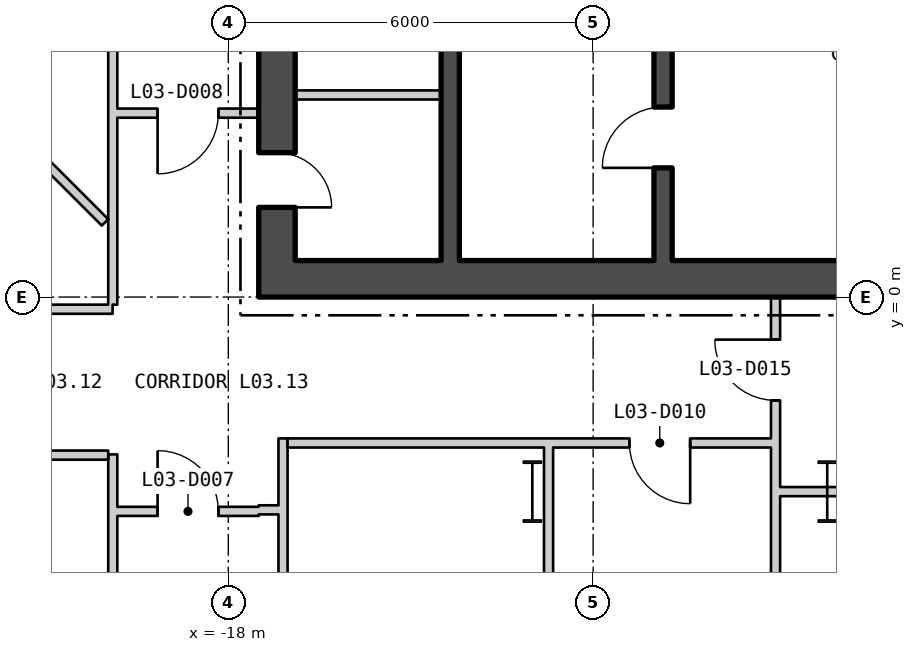
"""IFC4 building model, lengths in metres.
Left out: names, types, materials, properties, quantities, classifications, styles, units other than length and angle.
Written with IfcOpenShell. Run it as: python <this file> out.ifc"""

import sys

from ifc_helpers import new_model, si_unit, direction, frame, frame_2d, origin, origin_2d, place, context, subcontext, project, spatial, rectangle, i_section, extrude, element, fill, save


model = new_model("IFC4")
c1 = context("Model", 3, precision=1e-05, world=origin(), true_north=direction((0.0, 1.0)))
c2 = subcontext(c1, "Body", "Model", "MODEL_VIEW")
j1 = project(units=[si_unit("LENGTHUNIT", "METRE"), si_unit("PLANEANGLEUNIT", "RADIAN")], contexts=[c1])
p1 = place(None, origin())
s1 = spatial("IfcSite", under=j1, at=p1, CompositionType="ELEMENT")
p2 = place(p1, origin())
s2 = spatial("IfcBuilding", under=s1, at=p2, CompositionType="ELEMENT")
p3 = place(p2, frame((0.0, 0.0, 18.6)))
s3 = spatial("IfcBuildingStorey", under=s2, at=p3, CompositionType="ELEMENT", Elevation=18.6)
for number, where, z_axis, x_axis in (
    (1, (-8.15, -3.2, 0.0), (0.0, 0.0, 1.0), (1.0, 0.0, 0.0)),
    (2, (-13.0, -3.2, 0.0), (0.0, 0.0, 1.0), (1.0, 0.0, 0.0)),
):
    element("IfcColumn", number, at=place(p3, frame(where, z_axis=z_axis, x_axis=x_axis)), inside=s3, PredefinedType="COLUMN", context=c2, shape_type="SweptSolid", body=[
        extrude(i_section(OverallWidth=0.302, OverallDepth=1.008, WebThickness=0.021, FlangeThickness=0.04, at=origin_2d()), origin(), (0.0, 0.0, 1.0), 5.1),
    ])
p4 = place(p3, frame((-17.5, 0.3, 0.0), z_axis=(0.0, 0.0, 1.0), x_axis=(1.0, 0.0, 0.0)))
e3 = element("IfcWall", 3, at=p4, inside=s3, PredefinedType="SHEAR", context=c2, shape_type="SweptSolid", body=[
    extrude(rectangle(XDim=35.0, YDim=0.6, at=frame_2d((17.5, 0.0))), origin(), (0.0, 0.0, 1.0), 4.88),
])
p5 = place(p4, frame((12.0, 0.0, 0.0)))
e4 = element("IfcOpeningElement", 4, at=p5, cuts=e3, PredefinedType="OPENING", context=c2, shape_type="SweptSolid", body=[
    extrude(rectangle(XDim=1.8, YDim=2.4, at=frame_2d((0.9, 1.2))), frame((0.0, 0.31, 0.0), z_axis=(0.0, -1.0, 0.0), x_axis=(1.0, 0.0, 0.0)), (0.0, 0.0, 1.0), 0.62),
])
p6 = place(p4, frame((22.0, 0.0, 0.0)))
e5 = element("IfcOpeningElement", 5, at=p6, cuts=e3, PredefinedType="OPENING", context=c2, shape_type="SweptSolid", body=[
    extrude(rectangle(XDim=1.8, YDim=2.4, at=frame_2d((0.9, 1.2))), frame((0.0, 0.31, 0.0), z_axis=(0.0, -1.0, 0.0), x_axis=(1.0, 0.0, 0.0)), (0.0, 0.0, 1.0), 0.62),
])
p7 = place(p3, frame((-17.2, 0.6, 0.0), z_axis=(0.0, 0.0, 1.0), x_axis=(0.0, 1.0, 0.0)))
e6 = element("IfcWall", 6, at=p7, inside=s3, PredefinedType="SHEAR", context=c2, shape_type="SweptSolid", body=[
    extrude(rectangle(XDim=16.8, YDim=0.6, at=frame_2d((8.4, 0.0))), origin(), (0.0, 0.0, 1.0), 4.88),
])
p8 = place(p7, frame((5.7, 0.0, 0.0)))
e7 = element("IfcOpeningElement", 7, at=p8, cuts=e6, PredefinedType="OPENING", context=c2, shape_type="SweptSolid", body=[
    extrude(rectangle(XDim=1.5, YDim=2.1, at=frame_2d((0.75, 1.05))), frame((0.0, 0.31, 0.0), z_axis=(0.0, -1.0, 0.0), x_axis=(1.0, 0.0, 0.0)), (0.0, 0.0, 1.0), 0.62),
])
p9 = place(p7, frame((0.875, 0.0, 0.0)))
e8 = element("IfcOpeningElement", 8, at=p9, cuts=e6, PredefinedType="OPENING", context=c2, shape_type="SweptSolid", body=[
    extrude(rectangle(XDim=0.9, YDim=2.1, at=frame_2d((0.45, 1.05))), frame((0.0, 0.31, 0.0), z_axis=(0.0, -1.0, 0.0), x_axis=(1.0, 0.0, 0.0)), (0.0, 0.0, 1.0), 0.62),
])
p10 = place(p7, frame((3.724, 0.0, 0.0)))
e9 = element("IfcOpeningElement", 9, at=p10, cuts=e6, PredefinedType="OPENING", context=c2, shape_type="SweptSolid", body=[
    extrude(rectangle(XDim=0.9, YDim=2.1, at=frame_2d((0.45, 1.05))), frame((0.0, 0.31, 0.0), z_axis=(0.0, -1.0, 0.0), x_axis=(1.0, 0.0, 0.0)), (0.0, 0.0, 1.0), 0.62),
])
p11 = place(p7, frame((8.115, 0.0, 0.0)))
e10 = element("IfcOpeningElement", 10, at=p11, cuts=e6, PredefinedType="OPENING", context=c2, shape_type="SweptSolid", body=[
    extrude(rectangle(XDim=1.0, YDim=2.1, at=frame_2d((0.5, 1.05))), frame((0.0, 0.31, 0.0), z_axis=(0.0, -1.0, 0.0), x_axis=(1.0, 0.0, 0.0)), (0.0, 0.0, 1.0), 0.62),
])
p12 = place(p7, frame((11.528, 0.0, 0.0)))
e11 = element("IfcOpeningElement", 11, at=p12, cuts=e6, PredefinedType="OPENING", context=c2, shape_type="SweptSolid", body=[
    extrude(rectangle(XDim=0.9, YDim=2.1, at=frame_2d((0.45, 1.05))), frame((0.0, 0.31, 0.0), z_axis=(0.0, -1.0, 0.0), x_axis=(1.0, 0.0, 0.0)), (0.0, 0.0, 1.0), 0.62),
])
p13 = place(p7, frame((14.987, 0.0, 0.0)))
e12 = element("IfcOpeningElement", 12, at=p13, cuts=e6, PredefinedType="OPENING", context=c2, shape_type="SweptSolid", body=[
    extrude(rectangle(XDim=0.9, YDim=2.1, at=frame_2d((0.45, 1.05))), frame((0.0, 0.31, 0.0), z_axis=(0.0, -1.0, 0.0), x_axis=(1.0, 0.0, 0.0)), (0.0, 0.0, 1.0), 0.62),
])
p14 = place(p3, frame((-10.85, 0.6, 0.0), z_axis=(0.0, 0.0, 1.0), x_axis=(0.0, 1.0, 0.0)))
e13 = element("IfcWall", 13, at=p14, inside=s3, PredefinedType="SHEAR", context=c2, shape_type="SweptSolid", body=[
    extrude(rectangle(XDim=16.8, YDim=0.3, at=frame_2d((8.4, 0.0))), origin(), (0.0, 0.0, 1.0), 4.88),
])
p15 = place(p14, frame((5.075, 0.0, 0.0)))
e14 = element("IfcOpeningElement", 14, at=p15, cuts=e13, PredefinedType="OPENING", context=c2, shape_type="SweptSolid", body=[
    extrude(rectangle(XDim=1.25, YDim=2.1, at=frame_2d((0.625, 1.05))), frame((0.0, 0.16, 0.0), z_axis=(0.0, -1.0, 0.0), x_axis=(1.0, 0.0, 0.0)), (0.0, 0.0, 1.0), 0.32),
])
p16 = place(p14, frame((1.525, 0.0, 0.0)))
e15 = element("IfcOpeningElement", 15, at=p16, cuts=e13, PredefinedType="OPENING", context=c2, shape_type="SweptSolid", body=[
    extrude(rectangle(XDim=1.0, YDim=2.1, at=frame_2d((0.5, 1.05))), frame((0.0, 0.16, 0.0), z_axis=(0.0, -1.0, 0.0), x_axis=(1.0, 0.0, 0.0)), (0.0, 0.0, 1.0), 0.32),
])
p17 = place(p3, frame((-14.35, 0.6, 0.0), z_axis=(0.0, 0.0, 1.0), x_axis=(0.0, 1.0, 0.0)))
e16 = element("IfcWall", 16, at=p17, inside=s3, PredefinedType="SHEAR", context=c2, shape_type="SweptSolid", body=[
    extrude(rectangle(XDim=16.8, YDim=0.3, at=frame_2d((8.4, 0.0))), origin(), (0.0, 0.0, 1.0), 4.88),
])
p18 = place(p17, frame((5.7, 0.0, 0.0)))
e17 = element("IfcOpeningElement", 17, at=p18, cuts=e16, PredefinedType="OPENING", context=c2, shape_type="SweptSolid", body=[
    extrude(rectangle(XDim=1.5, YDim=2.1, at=frame_2d((0.75, 1.05))), frame((0.0, 0.16, 0.0), z_axis=(0.0, -1.0, 0.0), x_axis=(1.0, 0.0, 0.0)), (0.0, 0.0, 1.0), 0.32),
])
p19 = place(p3, frame((-16.9, 3.324, 0.0), z_axis=(0.0, 0.0, 1.0), x_axis=(1.0, 0.0, 0.0)))
e18 = element("IfcWall", 18, at=p19, inside=s3, PredefinedType="PARTITIONING", context=c2, shape_type="SweptSolid", body=[
    extrude(rectangle(XDim=2.4, YDim=0.15, at=frame_2d((1.2, 0.0))), origin(), (0.0, 0.0, 1.0), 4.88),
])
p20 = place(p3, frame((-26.75, -0.2, 0.0), z_axis=(0.0, 0.0, 1.0), x_axis=(1.0, 0.0, 0.0)))
e19 = element("IfcWall", 19, at=p20, inside=s3, PredefinedType="PARTITIONING", context=c2, shape_type="SweptSolid", body=[
    extrude(rectangle(XDim=6.847, YDim=0.15, at=frame_2d((3.424, 0.0))), origin(), (0.0, 0.0, 1.0), 4.88),
])
p21 = place(p20, frame((3.932, 0.0, 0.0)))
e20 = element("IfcOpeningElement", 20, at=p21, cuts=e19, PredefinedType="OPENING", context=c2, shape_type="SweptSolid", body=[
    extrude(rectangle(XDim=1.0, YDim=2.1, at=frame_2d((0.5, 1.05))), frame((0.0, 0.085, 0.0), z_axis=(0.0, -1.0, 0.0), x_axis=(1.0, 0.0, 0.0)), (0.0, 0.0, 1.0), 0.17),
])
p22 = place(p3, frame((-25.392, 6.592, 0.0), z_axis=(0.0, 0.0, 1.0), x_axis=(0.707106781187, -0.707106781187, 0.0)))
e21 = element("IfcWall", 21, at=p22, inside=s3, PredefinedType="PARTITIONING", context=c2, shape_type="SweptSolid", body=[
    extrude(rectangle(XDim=7.586, YDim=0.15, at=frame_2d((3.793, 0.0))), origin(), (0.0, 0.0, 1.0), 4.88),
])
p23 = place(p3, frame((-24.55, -2.6, 0.0), z_axis=(0.0, 0.0, 1.0), x_axis=(1.0, 0.0, 0.0)))
e22 = element("IfcWall", 22, at=p23, inside=s3, PredefinedType="PARTITIONING", context=c2, shape_type="SweptSolid", body=[
    extrude(rectangle(XDim=4.575, YDim=0.15, at=frame_2d((2.288, 0.0))), origin(), (0.0, 0.0, 1.0), 4.88),
])
p24 = place(p23, frame((1.736, 0.0, 0.0)))
e23 = element("IfcOpeningElement", 23, at=p24, cuts=e22, PredefinedType="OPENING", context=c2, shape_type="SweptSolid", body=[
    extrude(rectangle(XDim=1.0, YDim=2.1, at=frame_2d((0.5, 1.05))), frame((0.0, 0.085, 0.0), z_axis=(0.0, -1.0, 0.0), x_axis=(1.0, 0.0, 0.0)), (0.0, 0.0, 1.0), 0.17),
])
p25 = place(p3, frame((-19.9, -23.775, 0.0), z_axis=(0.0, 0.0, 1.0), x_axis=(0.0, 1.0, 0.0)))
e24 = element("IfcWall", 24, at=p25, inside=s3, PredefinedType="PARTITIONING", context=c2, shape_type="SweptSolid", body=[
    extrude(rectangle(XDim=21.187, YDim=0.15, at=frame_2d((10.594, 0.0))), origin(), (0.0, 0.0, 1.0), 4.88),
])
p26 = place(p25, frame((3.922, 0.0, 0.0)))
e25 = element("IfcOpeningElement", 25, at=p26, cuts=e24, PredefinedType="OPENING", context=c2, shape_type="SweptSolid", body=[
    extrude(rectangle(XDim=1.0, YDim=2.1, at=frame_2d((0.5, 1.05))), frame((0.0, 0.085, 0.0), z_axis=(0.0, -1.0, 0.0), x_axis=(1.0, 0.0, 0.0)), (0.0, 0.0, 1.0), 0.17),
])
p27 = place(p25, frame((12.423, 0.0, 0.0)))
e26 = element("IfcOpeningElement", 26, at=p27, cuts=e24, PredefinedType="OPENING", context=c2, shape_type="SweptSolid", body=[
    extrude(rectangle(XDim=1.0, YDim=2.1, at=frame_2d((0.5, 1.05))), frame((0.0, 0.085, 0.0), z_axis=(0.0, -1.0, 0.0), x_axis=(1.0, 0.0, 0.0)), (0.0, 0.0, 1.0), 0.17),
])
p28 = place(p3, frame((-19.9, -0.125, 0.0), z_axis=(0.0, 0.0, 1.0), x_axis=(0.0, 1.0, 0.0)))
e27 = element("IfcWall", 27, at=p28, inside=s3, PredefinedType="PARTITIONING", context=c2, shape_type="SweptSolid", body=[
    extrude(rectangle(XDim=1.15, YDim=0.15, at=frame_2d((0.575, 0.0))), origin(), (0.0, 0.0, 1.0), 4.88),
])
p29 = place(p3, frame((-19.9, 1.025, 0.0), z_axis=(0.0, 0.0, 1.0), x_axis=(0.0, 1.0, 0.0)))
e28 = element("IfcWall", 28, at=p29, inside=s3, PredefinedType="PARTITIONING", context=c2, shape_type="SweptSolid", body=[
    extrude(rectangle(XDim=16.9, YDim=0.15, at=frame_2d((8.45, 0.0))), origin(), (0.0, 0.0, 1.0), 4.88),
])
p30 = place(p29, frame((8.244, 0.0, 0.0)))
e29 = element("IfcOpeningElement", 29, at=p30, cuts=e28, PredefinedType="OPENING", context=c2, shape_type="SweptSolid", body=[
    extrude(rectangle(XDim=1.8, YDim=2.1, at=frame_2d((0.9, 1.05))), frame((0.0, 0.085, 0.0), z_axis=(0.0, -1.0, 0.0), x_axis=(1.0, 0.0, 0.0)), (0.0, 0.0, 1.0), 0.17),
])
p31 = place(p3, frame((-19.825, -3.525, 0.0), z_axis=(0.0, 0.0, 1.0), x_axis=(1.0, 0.0, 0.0)))
e30 = element("IfcWall", 30, at=p31, inside=s3, PredefinedType="PARTITIONING", context=c2, shape_type="SweptSolid", body=[
    extrude(rectangle(XDim=2.325, YDim=0.15, at=frame_2d((1.163, 0.0))), origin(), (0.0, 0.0, 1.0), 4.88),
])
p32 = place(p31, frame((0.662, 0.0, 0.0)))
e31 = element("IfcOpeningElement", 31, at=p32, cuts=e30, PredefinedType="OPENING", context=c2, shape_type="SweptSolid", body=[
    extrude(rectangle(XDim=1.0, YDim=2.1, at=frame_2d((0.5, 1.05))), frame((0.0, 0.085, 0.0), z_axis=(0.0, -1.0, 0.0), x_axis=(1.0, 0.0, 0.0)), (0.0, 0.0, 1.0), 0.17),
])
p33 = place(p3, frame((-19.825, 3.025, 0.0), z_axis=(0.0, 0.0, 1.0), x_axis=(1.0, 0.0, 0.0)))
e32 = element("IfcWall", 32, at=p33, inside=s3, PredefinedType="PARTITIONING", context=c2, shape_type="SweptSolid", body=[
    extrude(rectangle(XDim=2.325, YDim=0.15, at=frame_2d((1.163, 0.0))), origin(), (0.0, 0.0, 1.0), 4.33),
])
p34 = place(p33, frame((0.662, 0.0, 0.0)))
e33 = element("IfcOpeningElement", 33, at=p34, cuts=e32, PredefinedType="OPENING", context=c2, shape_type="SweptSolid", body=[
    extrude(rectangle(XDim=1.0, YDim=2.1, at=frame_2d((0.5, 1.05))), frame((0.0, 0.085, 0.0), z_axis=(0.0, -1.0, 0.0), x_axis=(1.0, 0.0, 0.0)), (0.0, 0.0, 1.0), 0.17),
])
p35 = place(p3, frame((-17.5, -3.5, 0.0), z_axis=(0.0, 0.0, 1.0), x_axis=(1.0, 0.0, 0.0)))
e34 = element("IfcWall", 34, at=p35, inside=s3, PredefinedType="PARTITIONING", context=c2, shape_type="SweptSolid", body=[
    extrude(rectangle(XDim=0.325, YDim=0.15, at=frame_2d((0.163, 0.0))), origin(), (0.0, 0.0, 1.0), 4.88),
])
p36 = place(p3, frame((-17.1, -21.375, 0.0), z_axis=(0.0, 0.0, 1.0), x_axis=(0.0, 1.0, 0.0)))
e35 = element("IfcWall", 35, at=p36, inside=s3, PredefinedType="PARTITIONING", context=c2, shape_type="SweptSolid", body=[
    extrude(rectangle(XDim=19.05, YDim=0.15, at=frame_2d((9.525, 0.0))), origin(), (0.0, 0.0, 1.0), 4.88),
])
p37 = place(p3, frame((-17.025, -2.4, 0.0), z_axis=(0.0, 0.0, 1.0), x_axis=(1.0, 0.0, 0.0)))
e36 = element("IfcWall", 36, at=p37, inside=s3, PredefinedType="PARTITIONING", context=c2, shape_type="SweptSolid", body=[
    extrude(rectangle(XDim=7.95, YDim=0.15, at=frame_2d((3.975, 0.0))), origin(), (0.0, 0.0, 1.0), 4.88),
])
p38 = place(p37, frame((5.621, 0.0, 0.0)))
e37 = element("IfcOpeningElement", 37, at=p38, cuts=e36, PredefinedType="OPENING", context=c2, shape_type="SweptSolid", body=[
    extrude(rectangle(XDim=1.0, YDim=2.1, at=frame_2d((0.5, 1.05))), frame((0.0, 0.085, 0.0), z_axis=(0.0, -1.0, 0.0), x_axis=(1.0, 0.0, 0.0)), (0.0, 0.0, 1.0), 0.17),
])
p39 = place(p3, frame((-12.733, -6.142, 0.0), z_axis=(0.0, 0.0, 1.0), x_axis=(0.0, 1.0, 0.0)))
e38 = element("IfcWall", 38, at=p39, inside=s3, PredefinedType="PARTITIONING", context=c2, shape_type="SweptSolid", body=[
    extrude(rectangle(XDim=3.042, YDim=0.15, at=frame_2d((1.521, 0.0))), origin(), (0.0, 0.0, 1.0), 4.19),
])
p40 = place(p3, frame((-12.733, -3.1, 0.0), z_axis=(0.0, 0.0, 1.0), x_axis=(0.0, 1.0, 0.0)))
e39 = element("IfcWall", 39, at=p40, inside=s3, PredefinedType="PARTITIONING", context=c2, shape_type="SweptSolid", body=[
    extrude(rectangle(XDim=0.625, YDim=0.15, at=frame_2d((0.312, 0.0))), origin(), (0.0, 0.0, 1.0), 4.28),
])
p41 = place(p3, frame((-9.0, -13.675, 0.0), z_axis=(0.0, 0.0, 1.0), x_axis=(0.0, 1.0, 0.0)))
e40 = element("IfcWall", 40, at=p41, inside=s3, PredefinedType="PARTITIONING", context=c2, shape_type="SweptSolid", body=[
    extrude(rectangle(XDim=13.675, YDim=0.15, at=frame_2d((6.838, 0.0))), origin(), (0.0, 0.0, 1.0), 4.88),
])
p42 = place(p41, frame((2.821, 0.0, 0.0)))
e41 = element("IfcOpeningElement", 41, at=p42, cuts=e40, PredefinedType="OPENING", context=c2, shape_type="SweptSolid", body=[
    extrude(rectangle(XDim=1.0, YDim=2.1, at=frame_2d((0.5, 1.05))), frame((0.0, 0.085, 0.0), z_axis=(0.0, -1.0, 0.0), x_axis=(1.0, 0.0, 0.0)), (0.0, 0.0, 1.0), 0.17),
])
p43 = place(p41, frame((11.975, 0.0, 0.0)))
e42 = element("IfcOpeningElement", 42, at=p43, cuts=e40, PredefinedType="OPENING", context=c2, shape_type="SweptSolid", body=[
    extrude(rectangle(XDim=1.0, YDim=2.1, at=frame_2d((0.5, 1.05))), frame((0.0, 0.085, 0.0), z_axis=(0.0, -1.0, 0.0), x_axis=(1.0, 0.0, 0.0)), (0.0, 0.0, 1.0), 0.17),
])
p44 = place(p3, frame((-8.925, -3.2, 0.0), z_axis=(0.0, 0.0, 1.0), x_axis=(1.0, 0.0, 0.0)))
e43 = element("IfcWall", 43, at=p44, inside=s3, PredefinedType="PARTITIONING", context=c2, shape_type="SweptSolid", body=[
    extrude(rectangle(XDim=0.775, YDim=0.15, at=frame_2d((0.388, 0.0))), origin(), (0.0, 0.0, 1.0), 4.09),
])
p45 = place(p3, frame((-8.15, -3.2, 0.0), z_axis=(0.0, 0.0, 1.0), x_axis=(1.0, 0.0, 0.0)))
e44 = element("IfcWall", 44, at=p45, inside=s3, PredefinedType="PARTITIONING", context=c2, shape_type="SweptSolid", body=[
    extrude(rectangle(XDim=2.225, YDim=0.15, at=frame_2d((1.113, 0.0))), origin(), (0.0, 0.0, 1.0), 3.97),
])
p46 = place(p45, frame((0.513, 0.0, 0.0)))
e45 = element("IfcOpeningElement", 45, at=p46, cuts=e44, PredefinedType="OPENING", context=c2, shape_type="SweptSolid", body=[
    extrude(rectangle(XDim=1.0, YDim=2.1, at=frame_2d((0.5, 1.05))), frame((0.0, 0.085, 0.0), z_axis=(0.0, -1.0, 0.0), x_axis=(1.0, 0.0, 0.0)), (0.0, 0.0, 1.0), 0.17),
])
p47 = place(p16, origin())
e46 = element("IfcDoor", 46, at=p47, inside=s3, OperationType="SINGLE_SWING_RIGHT", PredefinedType="DOOR", context=c2, shape_type="SweptSolid", body=[
    extrude(rectangle(XDim=1.0, YDim=2.1, at=frame_2d((0.5, 1.05))), frame((0.0, 0.025, 0.0), z_axis=(0.0, -1.0, 0.0), x_axis=(1.0, 0.0, 0.0)), (0.0, 0.0, 1.0), 0.05),
])
fill(e15, e46)
p48 = place(p9, origin())
e47 = element("IfcDoor", 47, at=p48, inside=s3, OperationType="SINGLE_SWING_LEFT", PredefinedType="DOOR", context=c2, shape_type="SweptSolid", body=[
    extrude(rectangle(XDim=0.9, YDim=2.1, at=frame_2d((0.45, 1.05))), frame((0.0, 0.025, 0.0), z_axis=(0.0, -1.0, 0.0), x_axis=(1.0, 0.0, 0.0)), (0.0, 0.0, 1.0), 0.05),
])
fill(e8, e47)
p49 = place(p32, origin())
e48 = element("IfcDoor", 48, at=p49, inside=s3, OperationType="SINGLE_SWING_RIGHT", PredefinedType="DOOR", context=c2, shape_type="SweptSolid", body=[
    extrude(rectangle(XDim=1.0, YDim=2.1, at=frame_2d((0.5, 1.05))), frame((0.0, 0.025, 0.0), z_axis=(0.0, -1.0, 0.0), x_axis=(1.0, 0.0, 0.0)), (0.0, 0.0, 1.0), 0.05),
])
fill(e31, e48)
p50 = place(p34, origin())
e49 = element("IfcDoor", 49, at=p50, inside=s3, OperationType="SINGLE_SWING_LEFT", PredefinedType="DOOR", context=c2, shape_type="SweptSolid", body=[
    extrude(rectangle(XDim=1.0, YDim=2.1, at=frame_2d((0.5, 1.05))), frame((0.0, 0.025, 0.0), z_axis=(0.0, -1.0, 0.0), x_axis=(1.0, 0.0, 0.0)), (0.0, 0.0, 1.0), 0.05),
])
fill(e33, e49)
p51 = place(p38, origin())
e50 = element("IfcDoor", 50, at=p51, inside=s3, OperationType="SINGLE_SWING_RIGHT", PredefinedType="DOOR", context=c2, shape_type="SweptSolid", body=[
    extrude(rectangle(XDim=1.0, YDim=2.1, at=frame_2d((0.5, 1.05))), frame((0.0, 0.025, 0.0), z_axis=(0.0, -1.0, 0.0), x_axis=(1.0, 0.0, 0.0)), (0.0, 0.0, 1.0), 0.05),
])
fill(e37, e50)
p52 = place(p43, origin())
e51 = element("IfcDoor", 51, at=p52, inside=s3, OperationType="SINGLE_SWING_LEFT", PredefinedType="DOOR", context=c2, shape_type="SweptSolid", body=[
    extrude(rectangle(XDim=1.0, YDim=2.1, at=frame_2d((0.5, 1.05))), frame((0.0, 0.025, 0.0), z_axis=(0.0, -1.0, 0.0), x_axis=(1.0, 0.0, 0.0)), (0.0, 0.0, 1.0), 0.05),
])
fill(e42, e51)
save(model, sys.argv[1])
